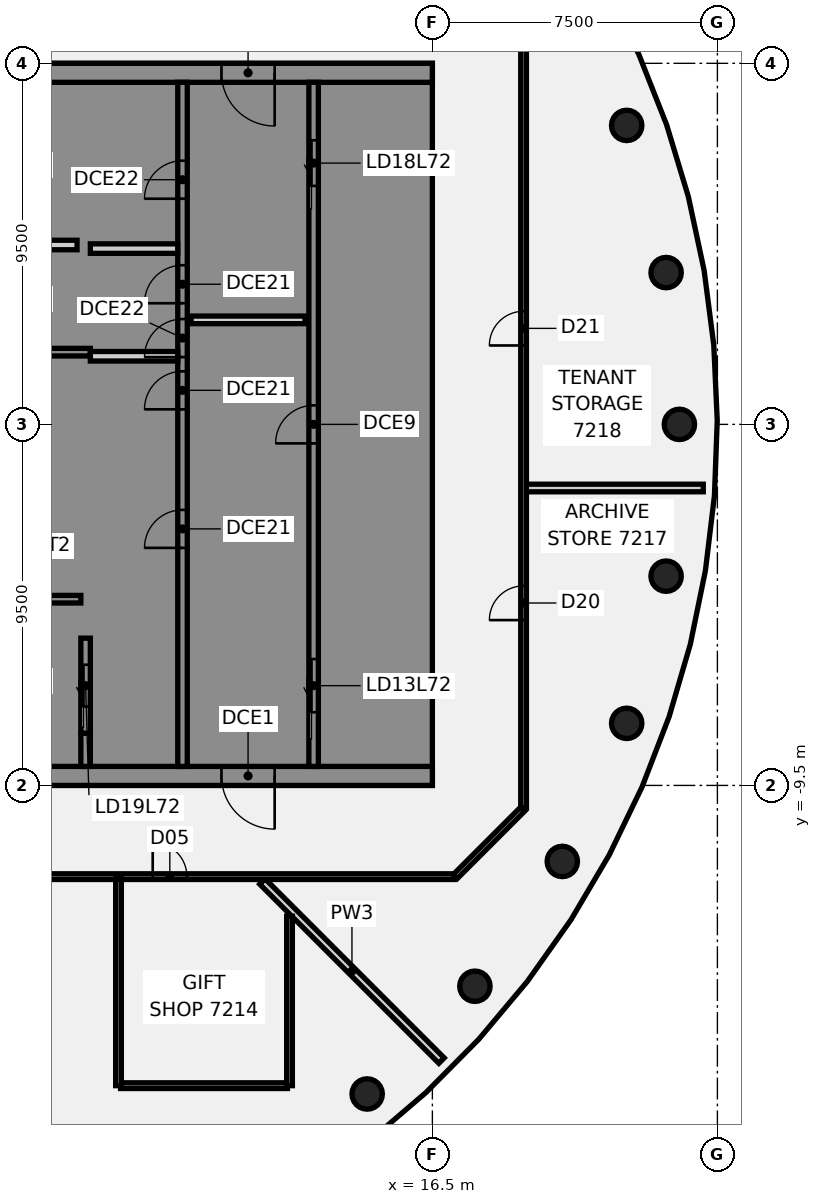
"""IFC4 building model, lengths in metres.
Left out: names, types, materials, properties, quantities, classifications, styles, units other than length and angle.
Written with IfcOpenShell. Run it as: python <this file> out.ifc"""

import sys

from ifc_helpers import new_model, si_unit, direction, frame, frame_2d, origin, origin_2d, place, context, subcontext, project, spatial, polyline, rectangle, circle, outline, extrude, element, fill, save


model = new_model("IFC4")
c1 = context("Model", 3, precision=1e-05, world=origin(), true_north=direction((0.0, 1.0)))
c2 = subcontext(c1, "Body", "Model", "MODEL_VIEW")
j1 = project(units=[si_unit("LENGTHUNIT", "METRE"), si_unit("PLANEANGLEUNIT", "RADIAN")], contexts=[c1])
p1 = place(None, origin())
s1 = spatial("IfcSite", under=j1, at=p1, CompositionType="ELEMENT")
p2 = place(p1, origin())
s2 = spatial("IfcBuilding", under=s1, at=p2, CompositionType="ELEMENT")
p3 = place(p2, frame((0.0, 0.0, 287.4)))
s3 = spatial("IfcBuildingStorey", under=s2, at=p3, CompositionType="ELEMENT", Elevation=287.4)
for number, where, z_axis, x_axis in (
    (1, (23.0, 0.0, -0.2), (0.0, 0.0, 1.0), (1.0, 0.0, 0.0)),
    (2, (22.651, 3.994, -0.2), (0.0, 0.0, 1.0), (1.0, 0.0, 0.0)),
    (3, (21.613, 7.866, -0.2), (0.0, 0.0, 1.0), (1.0, 0.0, 0.0)),
    (4, (14.784, -17.619, -0.2), (0.0, 0.0, 1.0), (1.0, 0.0, 0.0)),
    (5, (17.619, -14.784, -0.2), (0.0, 0.0, 1.0), (1.0, 0.0, 0.0)),
    (6, (19.919, -11.5, -0.2), (0.0, 0.0, 1.0), (1.0, 0.0, 0.0)),
    (7, (21.613, -7.866, -0.2), (0.0, 0.0, 1.0), (1.0, 0.0, 0.0)),
    (8, (22.651, -3.994, -0.2), (0.0, 0.0, 1.0), (1.0, 0.0, 0.0)),
):
    element("IfcColumn", number, at=place(p3, frame(where, z_axis=z_axis, x_axis=x_axis)), inside=s3, PredefinedType="COLUMN", context=c2, shape_type="SweptSolid", body=[
        extrude(circle(Radius=0.4, at=origin_2d()), origin(), (0.0, 0.0, 1.0), 7.0),
    ])
p4 = place(p3, frame((12.027, -12.027, 0.0), z_axis=(0.0, 0.0, 1.0), x_axis=(0.707106781187, -0.707106781187, 0.0)))
e9 = element("IfcWall", 9, at=p4, inside=s3, PredefinedType="PARTITIONING", context=c2, shape_type="SweptSolid", body=[
    extrude(rectangle(XDim=6.665, YDim=0.2, at=frame_2d((3.333, 0.0))), origin(), (0.0, 0.0, 1.0), 6.1),
])
p5 = place(p3, frame((-17.1, -11.9, 0.0), z_axis=(0.0, 0.0, 1.0), x_axis=(1.0, 0.0, 0.0)))
e10 = element("IfcWall", 10, at=p5, inside=s3, PredefinedType="PARTITIONING", context=c2, shape_type="SweptSolid", body=[
    extrude(rectangle(XDim=34.165, YDim=0.15, at=frame_2d((17.083, 0.0))), origin(), (0.0, 0.0, 1.0), 6.1),
])
p6 = place(p5, frame((7.9, 0.0, 0.0)))
e11 = element("IfcOpeningElement", 11, at=p6, cuts=e10, PredefinedType="OPENING", context=c2, shape_type="SweptSolid", body=[
    extrude(rectangle(XDim=0.9, YDim=2.1, at=frame_2d((0.45, 1.05))), frame((0.0, 0.085, 0.0), z_axis=(0.0, -1.0, 0.0), x_axis=(1.0, 0.0, 0.0)), (0.0, 0.0, 1.0), 0.17),
])
p7 = place(p5, frame((26.241, 0.0, 0.0)))
e12 = element("IfcOpeningElement", 12, at=p7, cuts=e10, PredefinedType="OPENING", context=c2, shape_type="SweptSolid", body=[
    extrude(rectangle(XDim=0.9, YDim=2.1, at=frame_2d((0.45, 1.05))), frame((0.0, 0.085, 0.0), z_axis=(0.0, -1.0, 0.0), x_axis=(1.0, 0.0, 0.0)), (0.0, 0.0, 1.0), 0.17),
])
p8 = place(p5, frame((16.959, 0.0, 0.0)))
e13 = element("IfcOpeningElement", 13, at=p8, cuts=e10, PredefinedType="OPENING", context=c2, shape_type="SweptSolid", body=[
    extrude(rectangle(XDim=1.8, YDim=2.1, at=frame_2d((0.9, 1.05))), frame((0.0, 0.085, 0.0), z_axis=(0.0, -1.0, 0.0), x_axis=(1.0, 0.0, 0.0)), (0.0, 0.0, 1.0), 0.17),
])
p9 = place(p5, frame((0.6, 0.0, 0.0)))
e14 = element("IfcOpeningElement", 14, at=p9, cuts=e10, PredefinedType="OPENING", context=c2, shape_type="SweptSolid", body=[
    extrude(rectangle(XDim=0.9, YDim=2.1, at=frame_2d((0.45, 1.05))), frame((0.0, 0.085, 0.0), z_axis=(0.0, -1.0, 0.0), x_axis=(1.0, 0.0, 0.0)), (0.0, 0.0, 1.0), 0.17),
])
p10 = place(p3, frame((8.296, -17.4, 0.0), z_axis=(0.0, 0.0, 1.0), x_axis=(1.0, 0.0, 0.0)))
e15 = element("IfcWall", 15, at=p10, inside=s3, PredefinedType="PARTITIONING", context=c2, shape_type="SweptSolid", body=[
    extrude(rectangle(XDim=4.39, YDim=0.15, at=frame_2d((2.195, 0.0))), origin(), (0.0, 0.0, 1.0), 6.1),
])
p11 = place(p3, frame((18.955, -1.674, 0.0), z_axis=(0.0, 0.0, 1.0), x_axis=(1.0, 0.0, 0.0)))
e16 = element("IfcWall", 16, at=p11, inside=s3, PredefinedType="PARTITIONING", context=c2, shape_type="SweptSolid", body=[
    extrude(rectangle(XDim=4.674, YDim=0.2, at=frame_2d((2.337, 0.0))), origin(), (0.0, 0.0, 1.0), 6.1),
])
p12 = place(p3, frame((17.1, -11.9, 0.0), z_axis=(0.0, 0.0, 1.0), x_axis=(0.707106781187, 0.707106781187, 0.0)))
e17 = element("IfcWall", 17, at=p12, inside=s3, PredefinedType="PARTITIONING", context=c2, shape_type="SweptSolid", body=[
    extrude(rectangle(XDim=2.505, YDim=0.15, at=frame_2d((1.253, 0.0))), origin(), (0.0, 0.0, 1.0), 6.1),
])
p13 = place(p3, frame((8.241, -17.4, 0.0), z_axis=(0.0, 0.0, 1.0), x_axis=(0.0, 1.0, 0.0)))
e18 = element("IfcWall", 18, at=p13, inside=s3, PredefinedType="PARTITIONING", context=c2, shape_type="SweptSolid", body=[
    extrude(rectangle(XDim=5.445, YDim=0.15, at=frame_2d((2.722, 0.0))), origin(), (0.0, 0.0, 1.0), 6.1),
])
p14 = place(p3, frame((12.741, -17.4, 0.0), z_axis=(0.0, 0.0, 1.0), x_axis=(0.0, 1.0, 0.0)))
e19 = element("IfcWall", 19, at=p14, inside=s3, PredefinedType="PARTITIONING", context=c2, shape_type="SweptSolid", body=[
    extrude(rectangle(XDim=4.459, YDim=0.15, at=frame_2d((2.229, 0.0))), origin(), (0.0, 0.0, 1.0), 6.1),
])
p15 = place(p3, frame((18.9, -10.1, 0.0), z_axis=(0.0, 0.0, 1.0), x_axis=(0.0, 1.0, 0.0)))
e20 = element("IfcWall", 20, at=p15, inside=s3, PredefinedType="PARTITIONING", context=c2, shape_type="SweptSolid", body=[
    extrude(rectangle(XDim=20.2, YDim=0.15, at=frame_2d((10.1, 0.0))), origin(), (0.0, 0.0, 1.0), 6.1),
])
p16 = place(p15, frame((4.95, 0.0, 0.0)))
e21 = element("IfcOpeningElement", 21, at=p16, cuts=e20, PredefinedType="OPENING", context=c2, shape_type="SweptSolid", body=[
    extrude(rectangle(XDim=0.9, YDim=2.1, at=frame_2d((0.45, 1.05))), frame((0.0, 0.085, 0.0), z_axis=(0.0, -1.0, 0.0), x_axis=(1.0, 0.0, 0.0)), (0.0, 0.0, 1.0), 0.17),
])
p17 = place(p15, frame((12.176, 0.0, 0.0)))
e22 = element("IfcOpeningElement", 22, at=p17, cuts=e20, PredefinedType="OPENING", context=c2, shape_type="SweptSolid", body=[
    extrude(rectangle(XDim=0.9, YDim=2.1, at=frame_2d((0.45, 1.05))), frame((0.0, 0.085, 0.0), z_axis=(0.0, -1.0, 0.0), x_axis=(1.0, 0.0, 0.0)), (0.0, 0.0, 1.0), 0.17),
])
p18 = place(p3, frame((16.5, -9.25, 0.0), z_axis=(0.0, 0.0, 1.0), x_axis=(-1.0, 0.0, 0.0)))
e23 = element("IfcWall", 23, at=p18, inside=s3, PredefinedType="SHEAR", context=c2, shape_type="SweptSolid", body=[
    extrude(rectangle(XDim=13.0, YDim=0.5, at=frame_2d((6.5, 0.0))), origin(), (0.0, 0.0, 1.0), 6.8),
])
p19 = place(p18, frame((4.15, 0.0, 0.0)))
e24 = element("IfcOpeningElement", 24, at=p19, cuts=e23, PredefinedType="OPENING", context=c2, shape_type="SweptSolid", body=[
    extrude(rectangle(XDim=1.4, YDim=2.1, at=frame_2d((0.7, 1.05))), frame((0.0, 0.26, 0.0), z_axis=(0.0, -1.0, 0.0), x_axis=(1.0, 0.0, 0.0)), (0.0, 0.0, 1.0), 0.52),
])
p20 = place(p18, frame((10.125, 0.0, 0.0)))
e25 = element("IfcOpeningElement", 25, at=p20, cuts=e23, PredefinedType="OPENING", context=c2, shape_type="SweptSolid", body=[
    extrude(rectangle(XDim=1.4, YDim=2.1, at=frame_2d((0.7, 1.05))), frame((0.0, 0.26, 0.0), z_axis=(0.0, -1.0, 0.0), x_axis=(1.0, 0.0, 0.0)), (0.0, 0.0, 1.0), 0.52),
])
p21 = place(p3, frame((16.5, 9.25, 0.0), z_axis=(0.0, 0.0, 1.0), x_axis=(-1.0, 0.0, 0.0)))
e26 = element("IfcWall", 26, at=p21, inside=s3, PredefinedType="SHEAR", context=c2, shape_type="SweptSolid", body=[
    extrude(rectangle(XDim=13.0, YDim=0.5, at=frame_2d((6.5, 0.0))), origin(), (0.0, 0.0, 1.0), 6.8),
])
p22 = place(p21, frame((4.15, 0.0, 0.0)))
e27 = element("IfcOpeningElement", 27, at=p22, cuts=e26, PredefinedType="OPENING", context=c2, shape_type="SweptSolid", body=[
    extrude(rectangle(XDim=1.4, YDim=2.1, at=frame_2d((0.7, 1.05))), frame((0.0, 0.26, 0.0), z_axis=(0.0, -1.0, 0.0), x_axis=(1.0, 0.0, 0.0)), (0.0, 0.0, 1.0), 0.52),
])
p23 = place(p3, frame((13.15, 2.75, 0.0), z_axis=(0.0, 0.0, 1.0), x_axis=(-1.0, 0.0, 0.0)))
e28 = element("IfcWall", 28, at=p23, inside=s3, PredefinedType="PARTITIONING", context=c2, shape_type="SweptSolid", body=[
    extrude(rectangle(XDim=3.0, YDim=0.2, at=frame_2d((1.5, 0.0))), origin(), (0.0, 0.0, 1.0), 6.8),
])
p24 = place(p3, origin())
e29 = element("IfcWall", 29, at=p24, inside=s3, PredefinedType="SHEAR", context=c2, shape_type="SweptSolid", body=[
    extrude(outline(polyline([(13.5, -8.125), (13.5, -9.0), (16.0, -9.0), (16.5, -9.0), (16.5, 9.0), (16.0, 9.0), (13.5, 9.0), (13.5, 8.125), (16.0, 8.125), (16.0, 5.625), (13.5, 5.625), (13.5, 5.375), (16.0, 5.375), (16.0, -5.375), (13.5, -5.375), (13.5, -5.625), (16.0, -5.625), (16.0, -8.125), (13.5, -8.125)])), origin(), (0.0, 0.0, 1.0), 6.8),
])
p25 = place(p3, origin())
e30 = element("IfcWall", 30, at=p25, inside=s3, PredefinedType="SHEAR", context=c2, shape_type="SweptSolid", body=[
    extrude(outline(polyline([(9.8, -5.625), (9.8, -5.375), (7.5, -5.375), (7.5, 8.125), (9.8, 8.125), (9.8, 9.0), (7.5, 9.0), (7.25, 9.0), (7.25, -5.625), (7.5, -5.625), (9.8, -5.625)])), origin(), (0.0, 0.0, 1.0), 6.8),
])
p26 = place(p3, origin())
e31 = element("IfcWall", 31, at=p26, inside=s3, PredefinedType="SHEAR", context=c2, shape_type="SweptSolid", body=[
    extrude(outline(polyline([(7.5, -8.125), (7.5, -9.0), (9.8, -9.0), (9.8, -8.125), (9.8, -5.625), (9.55, -5.625), (9.55, -8.125), (7.5, -8.125)])), origin(), (0.0, 0.0, 1.0), 6.8),
])
p27 = place(p3, frame((7.375, -9.0, 0.0), z_axis=(0.0, 0.0, 1.0), x_axis=(0.0, 1.0, 0.0)))
e32 = element("IfcWall", 32, at=p27, inside=s3, PredefinedType="SHEAR", context=c2, shape_type="SweptSolid", body=[
    extrude(rectangle(XDim=0.875, YDim=0.25, at=frame_2d((0.438, 0.0))), origin(), (0.0, 0.0, 1.0), 6.8),
])
p28 = place(p3, frame((7.5, 1.9, 0.0), z_axis=(0.0, 0.0, 1.0), x_axis=(-1.0, 0.0, 0.0)))
e33 = element("IfcWall", 33, at=p28, inside=s3, PredefinedType="SHEAR", context=c2, shape_type="SweptSolid", body=[
    extrude(rectangle(XDim=3.3, YDim=0.2, at=frame_2d((1.65, 0.0))), origin(), (0.0, 0.0, 1.0), 6.8),
])
p29 = place(p3, frame((13.375, -9.0, 0.0), z_axis=(0.0, 0.0, 1.0), x_axis=(0.0, 1.0, 0.0)))
e34 = element("IfcWall", 34, at=p29, inside=s3, PredefinedType="SHEAR", context=c2, shape_type="SweptSolid", body=[
    extrude(rectangle(XDim=18.0, YDim=0.25, at=frame_2d((9.0, 0.0))), origin(), (0.0, 0.0, 1.0), 6.8),
])
p30 = place(p29, frame((1.425, 0.0, 0.0)))
e35 = element("IfcOpeningElement", 35, at=p30, cuts=e34, PredefinedType="OPENING", context=c2, shape_type="SweptSolid", body=[
    extrude(rectangle(XDim=1.4, YDim=2.1, at=frame_2d((0.7, 1.05))), frame((0.0, 0.135, 0.0), z_axis=(0.0, -1.0, 0.0), x_axis=(1.0, 0.0, 0.0)), (0.0, 0.0, 1.0), 0.27),
])
p31 = place(p29, frame((15.275, 0.0, 0.0)))
e36 = element("IfcOpeningElement", 36, at=p31, cuts=e34, PredefinedType="OPENING", context=c2, shape_type="SweptSolid", body=[
    extrude(rectangle(XDim=1.2, YDim=2.1, at=frame_2d((0.6, 1.05))), frame((0.0, 0.135, 0.0), z_axis=(0.0, -1.0, 0.0), x_axis=(1.0, 0.0, 0.0)), (0.0, 0.0, 1.0), 0.27),
])
p32 = place(p29, frame((8.5, 0.0, 0.0)))
e37 = element("IfcOpeningElement", 37, at=p32, cuts=e34, PredefinedType="OPENING", context=c2, shape_type="SweptSolid", body=[
    extrude(rectangle(XDim=1.0, YDim=2.1, at=frame_2d((0.5, 1.05))), frame((0.0, 0.135, 0.0), z_axis=(0.0, -1.0, 0.0), x_axis=(1.0, 0.0, 0.0)), (0.0, 0.0, 1.0), 0.27),
])
p33 = place(p3, frame((9.925, -9.0, 0.0), z_axis=(0.0, 0.0, 1.0), x_axis=(0.0, 1.0, 0.0)))
e38 = element("IfcWall", 38, at=p33, inside=s3, PredefinedType="SHEAR", context=c2, shape_type="SweptSolid", body=[
    extrude(rectangle(XDim=18.0, YDim=0.25, at=frame_2d((9.0, 0.0))), origin(), (0.0, 0.0, 1.0), 6.8),
])
p34 = place(p33, frame((5.75, 0.0, 0.0)))
e39 = element("IfcOpeningElement", 39, at=p34, cuts=e38, PredefinedType="OPENING", context=c2, shape_type="SweptSolid", body=[
    extrude(rectangle(XDim=1.0, YDim=2.1, at=frame_2d((0.5, 1.05))), frame((0.0, 0.135, 0.0), z_axis=(0.0, -1.0, 0.0), x_axis=(1.0, 0.0, 0.0)), (0.0, 0.0, 1.0), 0.27),
])
p35 = place(p33, frame((9.396, 0.0, 0.0)))
e40 = element("IfcOpeningElement", 40, at=p35, cuts=e38, PredefinedType="OPENING", context=c2, shape_type="SweptSolid", body=[
    extrude(rectangle(XDim=1.0, YDim=2.1, at=frame_2d((0.5, 1.05))), frame((0.0, 0.135, 0.0), z_axis=(0.0, -1.0, 0.0), x_axis=(1.0, 0.0, 0.0)), (0.0, 0.0, 1.0), 0.27),
])
p36 = place(p33, frame((10.771, 0.0, 0.0)))
e41 = element("IfcOpeningElement", 41, at=p36, cuts=e38, PredefinedType="OPENING", context=c2, shape_type="SweptSolid", body=[
    extrude(rectangle(XDim=1.0, YDim=2.1, at=frame_2d((0.5, 1.05))), frame((0.0, 0.135, 0.0), z_axis=(0.0, -1.0, 0.0), x_axis=(1.0, 0.0, 0.0)), (0.0, 0.0, 1.0), 0.27),
])
p37 = place(p33, frame((12.188, 0.0, 0.0)))
e42 = element("IfcOpeningElement", 42, at=p37, cuts=e38, PredefinedType="OPENING", context=c2, shape_type="SweptSolid", body=[
    extrude(rectangle(XDim=1.0, YDim=2.1, at=frame_2d((0.5, 1.05))), frame((0.0, 0.135, 0.0), z_axis=(0.0, -1.0, 0.0), x_axis=(1.0, 0.0, 0.0)), (0.0, 0.0, 1.0), 0.27),
])
p38 = place(p33, frame((14.938, 0.0, 0.0)))
e43 = element("IfcOpeningElement", 43, at=p38, cuts=e38, PredefinedType="OPENING", context=c2, shape_type="SweptSolid", body=[
    extrude(rectangle(XDim=1.0, YDim=2.1, at=frame_2d((0.5, 1.05))), frame((0.0, 0.135, 0.0), z_axis=(0.0, -1.0, 0.0), x_axis=(1.0, 0.0, 0.0)), (0.0, 0.0, 1.0), 0.27),
])
p39 = place(p3, frame((7.375, -8.125, 0.0), z_axis=(0.0, 0.0, 1.0), x_axis=(0.0, 1.0, 0.0)))
e44 = element("IfcWall", 44, at=p39, inside=s3, PredefinedType="SHEAR", context=c2, shape_type="SweptSolid", body=[
    extrude(rectangle(XDim=2.5, YDim=0.25, at=frame_2d((1.25, 0.0))), origin(), (0.0, 0.0, 1.0), 6.8),
])
p40 = place(p39, frame((0.7, 0.0, 0.0)))
e45 = element("IfcOpeningElement", 45, at=p40, cuts=e44, PredefinedType="OPENING", context=c2, shape_type="SweptSolid", body=[
    extrude(rectangle(XDim=1.1, YDim=2.1, at=frame_2d((0.55, 1.05))), frame((0.0, 0.135, 0.0), z_axis=(0.0, -1.0, 0.0), x_axis=(1.0, 0.0, 0.0)), (0.0, 0.0, 1.0), 0.27),
])
p41 = place(p3, frame((7.15, 4.72, 0.0), z_axis=(0.0, 0.0, 1.0), x_axis=(-1.0, 0.0, 0.0)))
e46 = element("IfcWall", 46, at=p41, inside=s3, PredefinedType="PARTITIONING", context=c2, shape_type="SweptSolid", body=[
    extrude(rectangle(XDim=2.95, YDim=0.25, at=frame_2d((1.475, 0.0))), origin(), (0.0, 0.0, 1.0), 6.8),
])
p42 = place(p3, frame((7.25, -4.6, 0.0), z_axis=(0.0, 0.0, 1.0), x_axis=(-1.0, 0.0, 0.0)))
e47 = element("IfcWall", 47, at=p42, inside=s3, PredefinedType="SHEAR", context=c2, shape_type="SweptSolid", body=[
    extrude(rectangle(XDim=3.25, YDim=0.2, at=frame_2d((1.625, 0.0))), origin(), (0.0, 0.0, 1.0), 6.8),
])
p43 = place(p42, frame((1.025, 0.0, 0.0)))
e48 = element("IfcOpeningElement", 48, at=p43, cuts=e47, PredefinedType="OPENING", context=c2, shape_type="SweptSolid", body=[
    extrude(rectangle(XDim=1.1, YDim=2.1, at=frame_2d((0.55, 1.05))), frame((0.0, 0.11, 0.0), z_axis=(0.0, -1.0, 0.0), x_axis=(1.0, 0.0, 0.0)), (0.0, 0.0, 1.0), 0.22),
])
for number, where, z_axis, x_axis in (
    (49, (9.8, 1.792, 0.0), (0.0, 0.0, 1.0), (-1.0, 0.0, 0.0)),
    (50, (9.8, 4.625, 0.0), (0.0, 0.0, 1.0), (-1.0, 0.0, 0.0)),
):
    element("IfcWall", number, at=place(p3, frame(where, z_axis=z_axis, x_axis=x_axis)), inside=s3, PredefinedType="PARTITIONING", context=c2, shape_type="SweptSolid", body=[
        extrude(rectangle(XDim=2.3, YDim=0.25, at=frame_2d((1.15, 0.0))), origin(), (0.0, 0.0, 1.0), 6.8),
    ])
p44 = place(p7, frame((0.9, 0.0, 0.0), z_axis=(0.0, 0.0, 1.0), x_axis=(-1.0, 0.0, 0.0)))
e51 = element("IfcDoor", 51, at=p44, inside=s3, OperationType="SINGLE_SWING_RIGHT", PredefinedType="DOOR", context=c2, shape_type="SweptSolid", body=[
    extrude(rectangle(XDim=0.9, YDim=2.1, at=frame_2d((0.45, 1.05))), frame((0.0, 0.025, 0.0), z_axis=(0.0, -1.0, 0.0), x_axis=(1.0, 0.0, 0.0)), (0.0, 0.0, 1.0), 0.05),
])
fill(e12, e51)
p45 = place(p16, frame((0.9, 0.0, 0.0), z_axis=(0.0, 0.0, 1.0), x_axis=(-1.0, 0.0, 0.0)))
e52 = element("IfcDoor", 52, at=p45, inside=s3, OperationType="SINGLE_SWING_LEFT", PredefinedType="DOOR", context=c2, shape_type="SweptSolid", body=[
    extrude(rectangle(XDim=0.9, YDim=2.1, at=frame_2d((0.45, 1.05))), frame((0.0, 0.025, 0.0), z_axis=(0.0, -1.0, 0.0), x_axis=(1.0, 0.0, 0.0)), (0.0, 0.0, 1.0), 0.05),
])
fill(e21, e52)
p46 = place(p17, frame((0.9, 0.0, 0.0), z_axis=(0.0, 0.0, 1.0), x_axis=(-1.0, 0.0, 0.0)))
e53 = element("IfcDoor", 53, at=p46, inside=s3, OperationType="SINGLE_SWING_RIGHT", PredefinedType="DOOR", context=c2, shape_type="SweptSolid", body=[
    extrude(rectangle(XDim=0.9, YDim=2.1, at=frame_2d((0.45, 1.05))), frame((0.0, 0.025, 0.0), z_axis=(0.0, -1.0, 0.0), x_axis=(1.0, 0.0, 0.0)), (0.0, 0.0, 1.0), 0.05),
])
fill(e22, e53)
p47 = place(p19, origin())
e54 = element("IfcDoor", 54, at=p47, inside=s3, OperationType="SINGLE_SWING_LEFT", PredefinedType="DOOR", context=c2, shape_type="SweptSolid", body=[
    extrude(rectangle(XDim=1.4, YDim=2.1, at=frame_2d((0.7, 1.05))), frame((0.0, 0.025, 0.0), z_axis=(0.0, -1.0, 0.0), x_axis=(1.0, 0.0, 0.0)), (0.0, 0.0, 1.0), 0.05),
])
fill(e24, e54)
p48 = place(p22, origin())
e55 = element("IfcDoor", 55, at=p48, inside=s3, OperationType="SINGLE_SWING_LEFT", PredefinedType="DOOR", context=c2, shape_type="SweptSolid", body=[
    extrude(rectangle(XDim=1.4, YDim=2.1, at=frame_2d((0.7, 1.05))), frame((0.0, 0.025, 0.0), z_axis=(0.0, -1.0, 0.0), x_axis=(1.0, 0.0, 0.0)), (0.0, 0.0, 1.0), 0.05),
])
fill(e27, e55)
p49 = place(p30, origin())
e56 = element("IfcDoor", 56, at=p49, inside=s3, OperationType="SLIDING_TO_LEFT", PredefinedType="DOOR", context=c2, shape_type="SweptSolid", body=[
    extrude(rectangle(XDim=1.4, YDim=2.1, at=frame_2d((0.7, 1.05))), frame((0.0, 0.025, 0.0), z_axis=(0.0, -1.0, 0.0), x_axis=(1.0, 0.0, 0.0)), (0.0, 0.0, 1.0), 0.05),
])
fill(e35, e56)
p50 = place(p31, origin())
e57 = element("IfcDoor", 57, at=p50, inside=s3, OperationType="SLIDING_TO_LEFT", PredefinedType="DOOR", context=c2, shape_type="SweptSolid", body=[
    extrude(rectangle(XDim=1.2, YDim=2.1, at=frame_2d((0.6, 1.05))), frame((0.0, 0.025, 0.0), z_axis=(0.0, -1.0, 0.0), x_axis=(1.0, 0.0, 0.0)), (0.0, 0.0, 1.0), 0.05),
])
fill(e36, e57)
p51 = place(p40, origin())
e58 = element("IfcDoor", 58, at=p51, inside=s3, OperationType="SLIDING_TO_LEFT", PredefinedType="DOOR", context=c2, shape_type="SweptSolid", body=[
    extrude(rectangle(XDim=1.1, YDim=2.1, at=frame_2d((0.55, 1.05))), frame((0.0, 0.025, 0.0), z_axis=(0.0, -1.0, 0.0), x_axis=(1.0, 0.0, 0.0)), (0.0, 0.0, 1.0), 0.05),
])
fill(e45, e58)
p52 = place(p32, origin())
e59 = element("IfcDoor", 59, at=p52, inside=s3, OperationType="SINGLE_SWING_LEFT", PredefinedType="DOOR", context=c2, shape_type="SweptSolid", body=[
    extrude(rectangle(XDim=1.0, YDim=2.1, at=frame_2d((0.5, 1.05))), frame((0.0, 0.025, 0.0), z_axis=(0.0, -1.0, 0.0), x_axis=(1.0, 0.0, 0.0)), (0.0, 0.0, 1.0), 0.05),
])
fill(e37, e59)
p53 = place(p34, origin())
e60 = element("IfcDoor", 60, at=p53, inside=s3, OperationType="SINGLE_SWING_LEFT", PredefinedType="DOOR", context=c2, shape_type="SweptSolid", body=[
    extrude(rectangle(XDim=1.0, YDim=2.1, at=frame_2d((0.5, 1.05))), frame((0.0, 0.025, 0.0), z_axis=(0.0, -1.0, 0.0), x_axis=(1.0, 0.0, 0.0)), (0.0, 0.0, 1.0), 0.05),
])
fill(e39, e60)
p54 = place(p35, origin())
e61 = element("IfcDoor", 61, at=p54, inside=s3, OperationType="SINGLE_SWING_LEFT", PredefinedType="DOOR", context=c2, shape_type="SweptSolid", body=[
    extrude(rectangle(XDim=1.0, YDim=2.1, at=frame_2d((0.5, 1.05))), frame((0.0, 0.025, 0.0), z_axis=(0.0, -1.0, 0.0), x_axis=(1.0, 0.0, 0.0)), (0.0, 0.0, 1.0), 0.05),
])
fill(e40, e61)
p55 = place(p36, origin())
e62 = element("IfcDoor", 62, at=p55, inside=s3, OperationType="SINGLE_SWING_LEFT", PredefinedType="DOOR", context=c2, shape_type="SweptSolid", body=[
    extrude(rectangle(XDim=1.0, YDim=2.1, at=frame_2d((0.5, 1.05))), frame((0.0, 0.025, 0.0), z_axis=(0.0, -1.0, 0.0), x_axis=(1.0, 0.0, 0.0)), (0.0, 0.0, 1.0), 0.05),
])
fill(e41, e62)
p56 = place(p37, origin())
e63 = element("IfcDoor", 63, at=p56, inside=s3, OperationType="SINGLE_SWING_LEFT", PredefinedType="DOOR", context=c2, shape_type="SweptSolid", body=[
    extrude(rectangle(XDim=1.0, YDim=2.1, at=frame_2d((0.5, 1.05))), frame((0.0, 0.025, 0.0), z_axis=(0.0, -1.0, 0.0), x_axis=(1.0, 0.0, 0.0)), (0.0, 0.0, 1.0), 0.05),
])
fill(e42, e63)
p57 = place(p38, origin())
e64 = element("IfcDoor", 64, at=p57, inside=s3, OperationType="SINGLE_SWING_LEFT", PredefinedType="DOOR", context=c2, shape_type="SweptSolid", body=[
    extrude(rectangle(XDim=1.0, YDim=2.1, at=frame_2d((0.5, 1.05))), frame((0.0, 0.025, 0.0), z_axis=(0.0, -1.0, 0.0), x_axis=(1.0, 0.0, 0.0)), (0.0, 0.0, 1.0), 0.05),
])
fill(e43, e64)
save(model, sys.argv[1])
